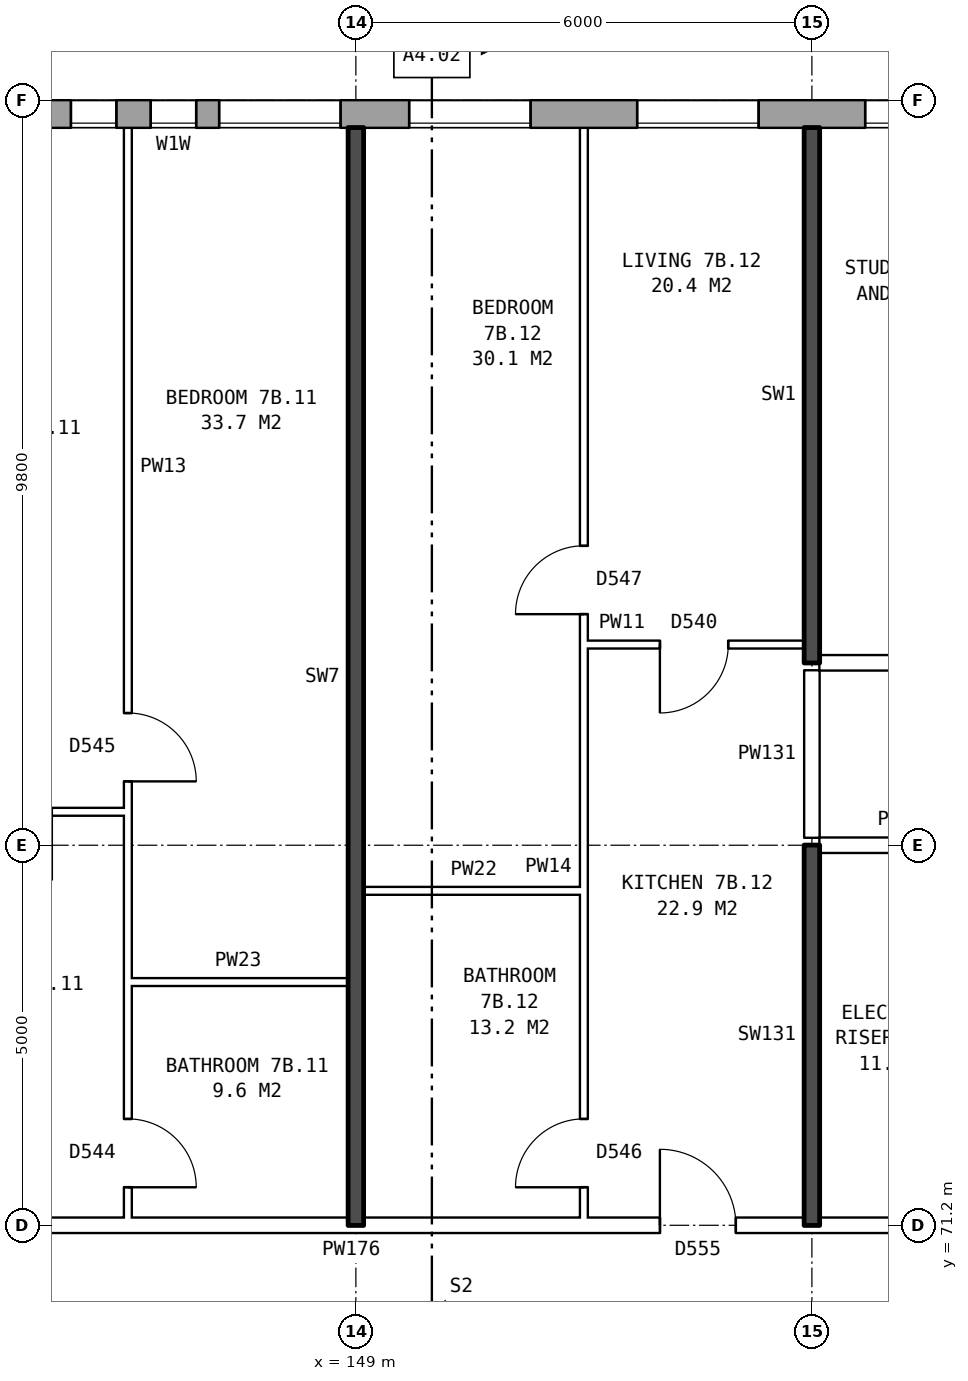
"""IFC4 building model, lengths in metres.
Left out: names, types, materials, properties, quantities, classifications, styles, units other than length and angle.
Written with IfcOpenShell. Run it as: python <this file> out.ifc"""

import sys

from ifc_helpers import new_model, si_unit, direction, frame, frame_2d, origin, place, context, subcontext, project, spatial, rectangle, extrude, element, fill, save


model = new_model("IFC4")
c1 = context("Model", 3, precision=1e-05, world=origin(), true_north=direction((0.0, 1.0)))
c2 = subcontext(c1, "Body", "Model", "MODEL_VIEW")
j1 = project(units=[si_unit("LENGTHUNIT", "METRE"), si_unit("PLANEANGLEUNIT", "RADIAN")], contexts=[c1])
p1 = place(None, origin())
s1 = spatial("IfcSite", under=j1, at=p1, CompositionType="ELEMENT")
p2 = place(p1, origin())
s2 = spatial("IfcBuilding", under=s1, at=p2, CompositionType="ELEMENT")
p3 = place(p2, frame((0.0, 0.0, 28.8)))
s3 = spatial("IfcBuildingStorey", under=s2, at=p3, CompositionType="ELEMENT", Elevation=28.8)
p4 = place(p3, frame((174.675, 85.82, 0.0), z_axis=(0.0, 0.0, 1.0), x_axis=(-1.0, 0.0, 0.0)))
e1 = element("IfcWall", 1, at=p4, inside=s3, PredefinedType="STANDARD", context=c2, shape_type="SweptSolid", body=[
    extrude(rectangle(XDim=40.601, YDim=0.36, at=frame_2d((20.3, 0.0))), origin(), (0.0, 0.0, 1.0), 2.85),
])
p5 = place(p4, frame((2.375, 0.0, 0.8)))
e2 = element("IfcOpeningElement", 2, at=p5, cuts=e1, PredefinedType="OPENING", context=c2, shape_type="SweptSolid", body=[
    extrude(rectangle(XDim=1.6, YDim=1.8, at=frame_2d((0.8, 0.9))), frame((0.0, 0.19, 0.0), z_axis=(0.0, -1.0, 0.0), x_axis=(1.0, 0.0, 0.0)), (0.0, 0.0, 1.0), 0.38),
])
p6 = place(p4, frame((5.375, 0.0, 0.8)))
e3 = element("IfcOpeningElement", 3, at=p6, cuts=e1, PredefinedType="OPENING", context=c2, shape_type="SweptSolid", body=[
    extrude(rectangle(XDim=1.6, YDim=1.8, at=frame_2d((0.8, 0.9))), frame((0.0, 0.19, 0.0), z_axis=(0.0, -1.0, 0.0), x_axis=(1.0, 0.0, 0.0)), (0.0, 0.0, 1.0), 0.38),
])
p7 = place(p4, frame((7.875, 0.0, 0.8)))
e4 = element("IfcOpeningElement", 4, at=p7, cuts=e1, PredefinedType="OPENING", context=c2, shape_type="SweptSolid", body=[
    extrude(rectangle(XDim=1.6, YDim=1.8, at=frame_2d((0.8, 0.9))), frame((0.0, 0.19, 0.0), z_axis=(0.0, -1.0, 0.0), x_axis=(1.0, 0.0, 0.0)), (0.0, 0.0, 1.0), 0.38),
])
p8 = place(p4, frame((9.775, 0.0, 1.7)))
e5 = element("IfcOpeningElement", 5, at=p8, cuts=e1, PredefinedType="OPENING", context=c2, shape_type="SweptSolid", body=[
    extrude(rectangle(XDim=0.8, YDim=0.9, at=frame_2d((0.4, 0.45))), frame((0.0, 0.19, 0.0), z_axis=(0.0, -1.0, 0.0), x_axis=(1.0, 0.0, 0.0)), (0.0, 0.0, 1.0), 0.38),
])
p9 = place(p4, frame((14.375, 0.0, 0.8)))
e6 = element("IfcOpeningElement", 6, at=p9, cuts=e1, PredefinedType="OPENING", context=c2, shape_type="SweptSolid", body=[
    extrude(rectangle(XDim=1.6, YDim=1.8, at=frame_2d((0.8, 0.9))), frame((0.0, 0.19, 0.0), z_axis=(0.0, -1.0, 0.0), x_axis=(1.0, 0.0, 0.0)), (0.0, 0.0, 1.0), 0.38),
])
p10 = place(p4, frame((17.375, 0.0, 0.8)))
e7 = element("IfcOpeningElement", 7, at=p10, cuts=e1, PredefinedType="OPENING", context=c2, shape_type="SweptSolid", body=[
    extrude(rectangle(XDim=1.6, YDim=1.8, at=frame_2d((0.8, 0.9))), frame((0.0, 0.19, 0.0), z_axis=(0.0, -1.0, 0.0), x_axis=(1.0, 0.0, 0.0)), (0.0, 0.0, 1.0), 0.38),
])
p11 = place(p4, frame((20.375, 0.0, 0.8)))
e8 = element("IfcOpeningElement", 8, at=p11, cuts=e1, PredefinedType="OPENING", context=c2, shape_type="SweptSolid", body=[
    extrude(rectangle(XDim=1.6, YDim=1.8, at=frame_2d((0.8, 0.9))), frame((0.0, 0.19, 0.0), z_axis=(0.0, -1.0, 0.0), x_axis=(1.0, 0.0, 0.0)), (0.0, 0.0, 1.0), 0.38),
])
p12 = place(p4, frame((23.375, 0.0, 0.8)))
e9 = element("IfcOpeningElement", 9, at=p12, cuts=e1, PredefinedType="OPENING", context=c2, shape_type="SweptSolid", body=[
    extrude(rectangle(XDim=1.6, YDim=1.8, at=frame_2d((0.8, 0.9))), frame((0.0, 0.19, 0.0), z_axis=(0.0, -1.0, 0.0), x_axis=(1.0, 0.0, 0.0)), (0.0, 0.0, 1.0), 0.38),
])
p13 = place(p4, frame((25.875, 0.0, 0.8)))
e10 = element("IfcOpeningElement", 10, at=p13, cuts=e1, PredefinedType="OPENING", context=c2, shape_type="SweptSolid", body=[
    extrude(rectangle(XDim=1.6, YDim=1.8, at=frame_2d((0.8, 0.9))), frame((0.0, 0.19, 0.0), z_axis=(0.0, -1.0, 0.0), x_axis=(1.0, 0.0, 0.0)), (0.0, 0.0, 1.0), 0.38),
])
p14 = place(p4, frame((28.825, 0.0, 0.15)))
e11 = element("IfcOpeningElement", 11, at=p14, cuts=e1, PredefinedType="OPENING", context=c2, shape_type="SweptSolid", body=[
    extrude(rectangle(XDim=0.6, YDim=0.9, at=frame_2d((0.3, 0.45))), frame((0.0, 0.19, 0.0), z_axis=(0.0, -1.0, 0.0), x_axis=(1.0, 0.0, 0.0)), (0.0, 0.0, 1.0), 0.38),
])
p15 = place(p4, frame((32.375, 0.0, 0.8)))
e12 = element("IfcOpeningElement", 12, at=p15, cuts=e1, PredefinedType="OPENING", context=c2, shape_type="SweptSolid", body=[
    extrude(rectangle(XDim=1.6, YDim=1.8, at=frame_2d((0.8, 0.9))), frame((0.0, 0.19, 0.0), z_axis=(0.0, -1.0, 0.0), x_axis=(1.0, 0.0, 0.0)), (0.0, 0.0, 1.0), 0.38),
])
p16 = place(p4, frame((35.375, 0.0, 0.8)))
e13 = element("IfcOpeningElement", 13, at=p16, cuts=e1, PredefinedType="OPENING", context=c2, shape_type="SweptSolid", body=[
    extrude(rectangle(XDim=1.6, YDim=1.8, at=frame_2d((0.8, 0.9))), frame((0.0, 0.19, 0.0), z_axis=(0.0, -1.0, 0.0), x_axis=(1.0, 0.0, 0.0)), (0.0, 0.0, 1.0), 0.38),
])
p17 = place(p4, frame((38.375, 0.0, 0.8)))
e14 = element("IfcOpeningElement", 14, at=p17, cuts=e1, PredefinedType="OPENING", context=c2, shape_type="SweptSolid", body=[
    extrude(rectangle(XDim=1.6, YDim=1.8, at=frame_2d((0.8, 0.9))), frame((0.0, 0.19, 0.0), z_axis=(0.0, -1.0, 0.0), x_axis=(1.0, 0.0, 0.0)), (0.0, 0.0, 1.0), 0.38),
])
p18 = place(p4, frame((12.275, 0.0, 0.8)))
e15 = element("IfcOpeningElement", 15, at=p18, cuts=e1, PredefinedType="OPENING", context=c2, shape_type="SweptSolid", body=[
    extrude(rectangle(XDim=1.2, YDim=1.2, at=frame_2d((0.6, 0.6))), frame((0.0, 0.19, 0.0), z_axis=(0.0, -1.0, 0.0), x_axis=(1.0, 0.0, 0.0)), (0.0, 0.0, 1.0), 0.38),
])
p19 = place(p4, frame((27.775, 0.0, 0.8)))
e16 = element("IfcOpeningElement", 16, at=p19, cuts=e1, PredefinedType="OPENING", context=c2, shape_type="SweptSolid", body=[
    extrude(rectangle(XDim=0.6, YDim=0.9, at=frame_2d((0.3, 0.45))), frame((0.0, 0.19, 0.0), z_axis=(0.0, -1.0, 0.0), x_axis=(1.0, 0.0, 0.0)), (0.0, 0.0, 1.0), 0.38),
])
p20 = place(p4, frame((30.025, 0.0, 1.65)))
e17 = element("IfcOpeningElement", 17, at=p20, cuts=e1, PredefinedType="OPENING", context=c2, shape_type="SweptSolid", body=[
    extrude(rectangle(XDim=1.4, YDim=0.9, at=frame_2d((0.7, 0.45))), frame((0.0, 0.19, 0.0), z_axis=(0.0, -1.0, 0.0), x_axis=(1.0, 0.0, 0.0)), (0.0, 0.0, 1.0), 0.38),
])
p21 = place(p3, frame((142.76, 71.2, 0.0), z_axis=(0.0, 0.0, 1.0), x_axis=(1.0, 0.0, 0.0)))
e18 = element("IfcWall", 18, at=p21, inside=s3, PredefinedType="PARTITIONING", context=c2, shape_type="SweptSolid", body=[
    extrude(rectangle(XDim=14.48, YDim=0.2, at=frame_2d((7.24, 0.0))), origin(), (0.0, 0.0, 1.0), 2.85),
])
p22 = place(p21, frame((1.12, 0.0, 0.0)))
e19 = element("IfcOpeningElement", 19, at=p22, cuts=e18, PredefinedType="OPENING", context=c2, shape_type="SweptSolid", body=[
    extrude(rectangle(XDim=1.0, YDim=2.1, at=frame_2d((0.5, 1.05))), frame((0.0, 0.11, 0.0), z_axis=(0.0, -1.0, 0.0), x_axis=(1.0, 0.0, 0.0)), (0.0, 0.0, 1.0), 0.22),
])
p23 = place(p21, frame((10.24, 0.0, 0.0)))
e20 = element("IfcOpeningElement", 20, at=p23, cuts=e18, PredefinedType="OPENING", context=c2, shape_type="SweptSolid", body=[
    extrude(rectangle(XDim=1.0, YDim=2.1, at=frame_2d((0.5, 1.05))), frame((0.0, 0.11, 0.0), z_axis=(0.0, -1.0, 0.0), x_axis=(1.0, 0.0, 0.0)), (0.0, 0.0, 1.0), 0.22),
])
for number, where, z_axis, x_axis in (
    (21, (146.0, 74.4, 0.0), (0.0, 0.0, 1.0), (1.0, 0.0, 0.0)),
    (22, (149.1, 75.6, 0.0), (0.0, 0.0, 1.0), (1.0, 0.0, 0.0)),
):
    element("IfcWall", number, at=place(p3, frame(where, z_axis=z_axis, x_axis=x_axis)), inside=s3, PredefinedType="PARTITIONING", context=c2, shape_type="SweptSolid", body=[
        extrude(rectangle(XDim=2.9, YDim=0.1, at=frame_2d((1.45, 0.0))), origin(), (0.0, 0.0, 1.0), 2.85),
    ])
p24 = place(p3, frame((155.1, 76.2, 0.0), z_axis=(0.0, 0.0, 1.0), x_axis=(1.0, 0.0, 0.0)))
e23 = element("IfcWall", 23, at=p24, inside=s3, PredefinedType="PARTITIONING", context=c2, shape_type="SweptSolid", body=[
    extrude(rectangle(XDim=2.14, YDim=0.2, at=frame_2d((1.07, 0.0))), origin(), (0.0, 0.0, 1.0), 2.85),
])
p25 = place(p3, frame((143.1, 76.64, 0.0), z_axis=(0.0, 0.0, 1.0), x_axis=(1.0, 0.0, 0.0)))
e24 = element("IfcWall", 24, at=p25, inside=s3, PredefinedType="PARTITIONING", context=c2, shape_type="SweptSolid", body=[
    extrude(rectangle(XDim=2.9, YDim=0.1, at=frame_2d((1.45, 0.0))), origin(), (0.0, 0.0, 1.0), 2.85),
])
p26 = place(p25, frame((1.0, 0.0, 0.0)))
e25 = element("IfcOpeningElement", 25, at=p26, cuts=e24, PredefinedType="OPENING", context=c2, shape_type="SweptSolid", body=[
    extrude(rectangle(XDim=0.9, YDim=2.1, at=frame_2d((0.45, 1.05))), frame((0.0, 0.06, 0.0), z_axis=(0.0, -1.0, 0.0), x_axis=(1.0, 0.0, 0.0)), (0.0, 0.0, 1.0), 0.12),
])
p27 = place(p3, frame((155.1, 78.6, 0.0), z_axis=(0.0, 0.0, 1.0), x_axis=(1.0, 0.0, 0.0)))
e26 = element("IfcWall", 26, at=p27, inside=s3, PredefinedType="PARTITIONING", context=c2, shape_type="SweptSolid", body=[
    extrude(rectangle(XDim=22.29, YDim=0.2, at=frame_2d((11.145, 0.0))), origin(), (0.0, 0.0, 1.0), 2.85),
])
p28 = place(p27, frame((1.45, 0.0, 0.0)))
e27 = element("IfcOpeningElement", 27, at=p28, cuts=e26, PredefinedType="OPENING", context=c2, shape_type="SweptSolid", body=[
    extrude(rectangle(XDim=1.0, YDim=2.1, at=frame_2d((0.5, 1.05))), frame((0.0, 0.11, 0.0), z_axis=(0.0, -1.0, 0.0), x_axis=(1.0, 0.0, 0.0)), (0.0, 0.0, 1.0), 0.22),
])
p29 = place(p27, frame((7.4, 0.0, 0.0)))
e28 = element("IfcOpeningElement", 28, at=p29, cuts=e26, PredefinedType="OPENING", context=c2, shape_type="SweptSolid", body=[
    extrude(rectangle(XDim=1.0, YDim=2.1, at=frame_2d((0.5, 1.05))), frame((0.0, 0.11, 0.0), z_axis=(0.0, -1.0, 0.0), x_axis=(1.0, 0.0, 0.0)), (0.0, 0.0, 1.0), 0.22),
])
p30 = place(p27, frame((14.4, 0.0, 0.0)))
e29 = element("IfcOpeningElement", 29, at=p30, cuts=e26, PredefinedType="OPENING", context=c2, shape_type="SweptSolid", body=[
    extrude(rectangle(XDim=1.0, YDim=2.1, at=frame_2d((0.5, 1.05))), frame((0.0, 0.11, 0.0), z_axis=(0.0, -1.0, 0.0), x_axis=(1.0, 0.0, 0.0)), (0.0, 0.0, 1.0), 0.22),
])
p31 = place(p3, frame((152.0, 78.84, 0.0), z_axis=(0.0, 0.0, 1.0), x_axis=(1.0, 0.0, 0.0)))
e30 = element("IfcWall", 30, at=p31, inside=s3, PredefinedType="PARTITIONING", context=c2, shape_type="SweptSolid", body=[
    extrude(rectangle(XDim=2.9, YDim=0.1, at=frame_2d((1.45, 0.0))), origin(), (0.0, 0.0, 1.0), 2.85),
])
p32 = place(p31, frame((1.0, 0.0, 0.0)))
e31 = element("IfcOpeningElement", 31, at=p32, cuts=e30, PredefinedType="OPENING", context=c2, shape_type="SweptSolid", body=[
    extrude(rectangle(XDim=0.9, YDim=2.1, at=frame_2d((0.45, 1.05))), frame((0.0, 0.06, 0.0), z_axis=(0.0, -1.0, 0.0), x_axis=(1.0, 0.0, 0.0)), (0.0, 0.0, 1.0), 0.12),
])
p33 = place(p3, frame((146.0, 71.3, 0.0), z_axis=(0.0, 0.0, 1.0), x_axis=(0.0, 1.0, 0.0)))
e32 = element("IfcWall", 32, at=p33, inside=s3, PredefinedType="PARTITIONING", context=c2, shape_type="SweptSolid", body=[
    extrude(rectangle(XDim=14.34, YDim=0.1, at=frame_2d((7.17, 0.0))), origin(), (0.0, 0.0, 1.0), 2.85),
])
p34 = place(p33, frame((5.74, 0.0, 0.0)))
e33 = element("IfcOpeningElement", 33, at=p34, cuts=e32, PredefinedType="OPENING", context=c2, shape_type="SweptSolid", body=[
    extrude(rectangle(XDim=0.9, YDim=2.1, at=frame_2d((0.45, 1.05))), frame((0.0, 0.06, 0.0), z_axis=(0.0, -1.0, 0.0), x_axis=(1.0, 0.0, 0.0)), (0.0, 0.0, 1.0), 0.12),
])
p35 = place(p33, frame((0.4, 0.0, 0.0)))
e34 = element("IfcOpeningElement", 34, at=p35, cuts=e32, PredefinedType="OPENING", context=c2, shape_type="SweptSolid", body=[
    extrude(rectangle(XDim=0.9, YDim=2.1, at=frame_2d((0.45, 1.05))), frame((0.0, 0.06, 0.0), z_axis=(0.0, -1.0, 0.0), x_axis=(1.0, 0.0, 0.0)), (0.0, 0.0, 1.0), 0.12),
])
p36 = place(p3, frame((149.0, 71.2, 0.0), z_axis=(0.0, 0.0, 1.0), x_axis=(0.0, 1.0, 0.0)))
e35 = element("IfcWall", 35, at=p36, inside=s3, PredefinedType="SOLIDWALL", context=c2, shape_type="SweptSolid", body=[
    extrude(rectangle(XDim=14.44, YDim=0.2, at=frame_2d((7.22, 0.0))), origin(), (0.0, 0.0, 1.0), 2.85),
])
p37 = place(p3, frame((152.0, 71.3, 0.0), z_axis=(0.0, 0.0, 1.0), x_axis=(0.0, 1.0, 0.0)))
e36 = element("IfcWall", 36, at=p37, inside=s3, PredefinedType="PARTITIONING", context=c2, shape_type="SweptSolid", body=[
    extrude(rectangle(XDim=14.34, YDim=0.1, at=frame_2d((7.17, 0.0))), origin(), (0.0, 0.0, 1.0), 2.85),
])
p38 = place(p37, frame((7.94, 0.0, 0.0)))
e37 = element("IfcOpeningElement", 37, at=p38, cuts=e36, PredefinedType="OPENING", context=c2, shape_type="SweptSolid", body=[
    extrude(rectangle(XDim=0.9, YDim=2.1, at=frame_2d((0.45, 1.05))), frame((0.0, 0.06, 0.0), z_axis=(0.0, -1.0, 0.0), x_axis=(1.0, 0.0, 0.0)), (0.0, 0.0, 1.0), 0.12),
])
p39 = place(p37, frame((0.4, 0.0, 0.0)))
e38 = element("IfcOpeningElement", 38, at=p39, cuts=e36, PredefinedType="OPENING", context=c2, shape_type="SweptSolid", body=[
    extrude(rectangle(XDim=0.9, YDim=2.1, at=frame_2d((0.45, 1.05))), frame((0.0, 0.06, 0.0), z_axis=(0.0, -1.0, 0.0), x_axis=(1.0, 0.0, 0.0)), (0.0, 0.0, 1.0), 0.12),
])
p40 = place(p3, frame((155.0, 71.2, 0.0), z_axis=(0.0, 0.0, 1.0), x_axis=(0.0, 1.0, 0.0)))
e39 = element("IfcWall", 39, at=p40, inside=s3, PredefinedType="SOLIDWALL", context=c2, shape_type="SweptSolid", body=[
    extrude(rectangle(XDim=5.0, YDim=0.2, at=frame_2d((2.5, 0.0))), origin(), (0.0, 0.0, 1.0), 2.85),
])
p41 = place(p3, frame((155.0, 76.3, 0.0), z_axis=(0.0, 0.0, 1.0), x_axis=(0.0, 1.0, 0.0)))
e40 = element("IfcWall", 40, at=p41, inside=s3, PredefinedType="PARTITIONING", context=c2, shape_type="SweptSolid", body=[
    extrude(rectangle(XDim=2.2, YDim=0.2, at=frame_2d((1.1, 0.0))), origin(), (0.0, 0.0, 1.0), 2.85),
])
p42 = place(p3, frame((155.0, 78.6, 0.0), z_axis=(0.0, 0.0, 1.0), x_axis=(0.0, 1.0, 0.0)))
e41 = element("IfcWall", 41, at=p42, inside=s3, PredefinedType="SOLIDWALL", context=c2, shape_type="SweptSolid", body=[
    extrude(rectangle(XDim=7.04, YDim=0.2, at=frame_2d((3.52, 0.0))), origin(), (0.0, 0.0, 1.0), 2.85),
])
p43 = place(p10, origin())
e42 = element("IfcWindow", 42, at=p43, inside=s3, PartitioningType="SINGLE_PANEL", PredefinedType="WINDOW", context=c2, shape_type="SweptSolid", body=[
    extrude(rectangle(XDim=1.6, YDim=1.8, at=frame_2d((0.8, 0.9))), frame((0.0, 0.15, 0.0), z_axis=(0.0, -1.0, 0.0), x_axis=(1.0, 0.0, 0.0)), (0.0, 0.0, 1.0), 0.06),
])
fill(e7, e42)
p44 = place(p11, origin())
e43 = element("IfcWindow", 43, at=p44, inside=s3, PartitioningType="SINGLE_PANEL", PredefinedType="WINDOW", context=c2, shape_type="SweptSolid", body=[
    extrude(rectangle(XDim=1.6, YDim=1.8, at=frame_2d((0.8, 0.9))), frame((0.0, 0.15, 0.0), z_axis=(0.0, -1.0, 0.0), x_axis=(1.0, 0.0, 0.0)), (0.0, 0.0, 1.0), 0.06),
])
fill(e8, e43)
p45 = place(p12, origin())
e44 = element("IfcWindow", 44, at=p45, inside=s3, PartitioningType="SINGLE_PANEL", PredefinedType="WINDOW", context=c2, shape_type="SweptSolid", body=[
    extrude(rectangle(XDim=1.6, YDim=1.8, at=frame_2d((0.8, 0.9))), frame((0.0, 0.15, 0.0), z_axis=(0.0, -1.0, 0.0), x_axis=(1.0, 0.0, 0.0)), (0.0, 0.0, 1.0), 0.06),
])
fill(e9, e44)
p46 = place(p13, origin())
e45 = element("IfcWindow", 45, at=p46, inside=s3, PartitioningType="SINGLE_PANEL", PredefinedType="WINDOW", context=c2, shape_type="SweptSolid", body=[
    extrude(rectangle(XDim=1.6, YDim=1.8, at=frame_2d((0.8, 0.9))), frame((0.0, 0.15, 0.0), z_axis=(0.0, -1.0, 0.0), x_axis=(1.0, 0.0, 0.0)), (0.0, 0.0, 1.0), 0.06),
])
fill(e10, e45)
p47 = place(p14, origin())
e46 = element("IfcWindow", 46, at=p47, inside=s3, PartitioningType="SINGLE_PANEL", PredefinedType="WINDOW", context=c2, shape_type="SweptSolid", body=[
    extrude(rectangle(XDim=0.6, YDim=0.9, at=frame_2d((0.3, 0.45))), frame((0.0, 0.15, 0.0), z_axis=(0.0, -1.0, 0.0), x_axis=(1.0, 0.0, 0.0)), (0.0, 0.0, 1.0), 0.06),
])
fill(e11, e46)
p48 = place(p34, frame((0.9, 0.0, 0.0), z_axis=(0.0, 0.0, 1.0), x_axis=(-1.0, 0.0, 0.0)))
e47 = element("IfcDoor", 47, at=p48, inside=s3, OperationType="SINGLE_SWING_RIGHT", PredefinedType="DOOR", context=c2, shape_type="SweptSolid", body=[
    extrude(rectangle(XDim=0.9, YDim=2.1, at=frame_2d((0.45, 1.05))), frame((0.0, 0.025, 0.0), z_axis=(0.0, -1.0, 0.0), x_axis=(1.0, 0.0, 0.0)), (0.0, 0.0, 1.0), 0.05),
])
fill(e33, e47)
p49 = place(p35, frame((0.9, 0.0, 0.0), z_axis=(0.0, 0.0, 1.0), x_axis=(-1.0, 0.0, 0.0)))
e48 = element("IfcDoor", 48, at=p49, inside=s3, OperationType="SINGLE_SWING_RIGHT", PredefinedType="DOOR", context=c2, shape_type="SweptSolid", body=[
    extrude(rectangle(XDim=0.9, YDim=2.1, at=frame_2d((0.45, 1.05))), frame((0.0, 0.025, 0.0), z_axis=(0.0, -1.0, 0.0), x_axis=(1.0, 0.0, 0.0)), (0.0, 0.0, 1.0), 0.05),
])
fill(e34, e48)
p50 = place(p38, origin())
e49 = element("IfcDoor", 49, at=p50, inside=s3, OperationType="SINGLE_SWING_LEFT", PredefinedType="DOOR", context=c2, shape_type="SweptSolid", body=[
    extrude(rectangle(XDim=0.9, YDim=2.1, at=frame_2d((0.45, 1.05))), frame((0.0, 0.025, 0.0), z_axis=(0.0, -1.0, 0.0), x_axis=(1.0, 0.0, 0.0)), (0.0, 0.0, 1.0), 0.05),
])
fill(e37, e49)
p51 = place(p23, origin())
e50 = element("IfcDoor", 50, at=p51, inside=s3, OperationType="SINGLE_SWING_LEFT", PredefinedType="DOOR", context=c2, shape_type="SweptSolid", body=[
    extrude(rectangle(XDim=1.0, YDim=2.1, at=frame_2d((0.5, 1.05))), frame((0.0, 0.025, 0.0), z_axis=(0.0, -1.0, 0.0), x_axis=(1.0, 0.0, 0.0)), (0.0, 0.0, 1.0), 0.05),
])
fill(e20, e50)
p52 = place(p32, frame((0.9, 0.0, 0.0), z_axis=(0.0, 0.0, 1.0), x_axis=(-1.0, 0.0, 0.0)))
e51 = element("IfcDoor", 51, at=p52, inside=s3, OperationType="SINGLE_SWING_RIGHT", PredefinedType="DOOR", context=c2, shape_type="SweptSolid", body=[
    extrude(rectangle(XDim=0.9, YDim=2.1, at=frame_2d((0.45, 1.05))), frame((0.0, 0.025, 0.0), z_axis=(0.0, -1.0, 0.0), x_axis=(1.0, 0.0, 0.0)), (0.0, 0.0, 1.0), 0.05),
])
fill(e31, e51)
p53 = place(p39, origin())
e52 = element("IfcDoor", 52, at=p53, inside=s3, OperationType="SINGLE_SWING_LEFT", PredefinedType="DOOR", context=c2, shape_type="SweptSolid", body=[
    extrude(rectangle(XDim=0.9, YDim=2.1, at=frame_2d((0.45, 1.05))), frame((0.0, 0.025, 0.0), z_axis=(0.0, -1.0, 0.0), x_axis=(1.0, 0.0, 0.0)), (0.0, 0.0, 1.0), 0.05),
])
fill(e38, e52)
p54 = place(p19, origin())
e53 = element("IfcWindow", 53, at=p54, inside=s3, PartitioningType="SINGLE_PANEL", PredefinedType="WINDOW", context=c2, shape_type="SweptSolid", body=[
    extrude(rectangle(XDim=0.6, YDim=0.9, at=frame_2d((0.3, 0.45))), frame((0.0, 0.15, 0.0), z_axis=(0.0, -1.0, 0.0), x_axis=(1.0, 0.0, 0.0)), (0.0, 0.0, 1.0), 0.06),
])
fill(e16, e53)
save(model, sys.argv[1])
